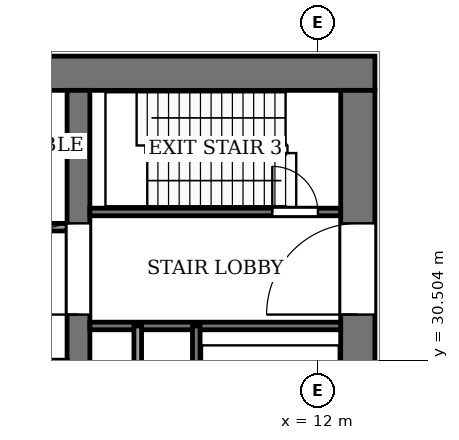
"""IFC4 building model, lengths in metres.
Left out: names, types, materials, properties, quantities, classifications, styles, units other than length and angle.
Written with IfcOpenShell. Run it as: python <this file> out.ifc"""

import sys

from ifc_helpers import new_model, si_unit, direction, frame, frame_2d, origin, place, context, subcontext, project, spatial, rectangle, extrude, element, fill, save


model = new_model("IFC4")
c1 = context("Model", 3, precision=1e-05, world=origin(), true_north=direction((0.0, 1.0)))
c2 = subcontext(c1, "Body", "Model", "MODEL_VIEW")
j1 = project(units=[si_unit("LENGTHUNIT", "METRE"), si_unit("PLANEANGLEUNIT", "RADIAN")], contexts=[c1])
p1 = place(None, origin())
s1 = spatial("IfcSite", under=j1, at=p1, CompositionType="ELEMENT")
p2 = place(p1, origin())
s2 = spatial("IfcBuilding", under=s1, at=p2, CompositionType="ELEMENT")
p3 = place(p2, frame((0.0, 0.0, 177.0)))
s3 = spatial("IfcBuildingStorey", under=s2, at=p3, CompositionType="ELEMENT", Elevation=177.0)
p4 = place(p3, frame((-13.5, 38.05, -0.13), z_axis=(0.0, 0.0, 1.0), x_axis=(1.0, 0.0, 0.0)))
e1 = element("IfcWall", 1, at=p4, inside=s3, PredefinedType="SHEAR", context=c2, shape_type="SweptSolid", body=[
    extrude(rectangle(XDim=27.0, YDim=0.9, at=frame_2d((13.5, 0.0))), origin(), (0.0, 0.0, 1.0), 5.0),
])
p5 = place(p3, frame((13.05, 18.4, -0.13), z_axis=(0.0, 0.0, 1.0), x_axis=(0.0, 1.0, 0.0)))
e2 = element("IfcWall", 2, at=p5, inside=s3, PredefinedType="SHEAR", context=c2, shape_type="SweptSolid", body=[
    extrude(rectangle(XDim=19.2, YDim=0.9, at=frame_2d((9.6, 0.0))), origin(), (0.0, 0.0, 1.0), 5.0),
])
p6 = place(p5, frame((2.8, 0.0, 0.13)))
e3 = element("IfcOpeningElement", 3, at=p6, cuts=e2, PredefinedType="OPENING", context=c2, shape_type="SweptSolid", body=[
    extrude(rectangle(XDim=2.4, YDim=2.4, at=frame_2d((1.2, 1.2))), frame((0.0, 0.46, 0.0), z_axis=(0.0, -1.0, 0.0), x_axis=(1.0, 0.0, 0.0)), (0.0, 0.0, 1.0), 0.92),
])
p7 = place(p5, frame((13.3, 0.0, 0.13)))
e4 = element("IfcOpeningElement", 4, at=p7, cuts=e2, PredefinedType="OPENING", context=c2, shape_type="SweptSolid", body=[
    extrude(rectangle(XDim=2.4, YDim=2.4, at=frame_2d((1.2, 1.2))), frame((0.0, 0.46, 0.0), z_axis=(0.0, -1.0, 0.0), x_axis=(1.0, 0.0, 0.0)), (0.0, 0.0, 1.0), 0.92),
])
p8 = place(p3, frame((5.7, 18.4, -0.13), z_axis=(0.0, 0.0, 1.0), x_axis=(0.0, 1.0, 0.0)))
e5 = element("IfcWall", 5, at=p8, inside=s3, PredefinedType="SHEAR", context=c2, shape_type="SweptSolid", body=[
    extrude(rectangle(XDim=19.2, YDim=0.6, at=frame_2d((9.6, 0.0))), origin(), (0.0, 0.0, 1.0), 5.0),
])
p9 = place(p8, frame((13.3, 0.0, 0.13)))
e6 = element("IfcOpeningElement", 6, at=p9, cuts=e5, PredefinedType="OPENING", context=c2, shape_type="SweptSolid", body=[
    extrude(rectangle(XDim=2.4, YDim=2.4, at=frame_2d((1.2, 1.2))), frame((0.0, 0.31, 0.0), z_axis=(0.0, -1.0, 0.0), x_axis=(1.0, 0.0, 0.0)), (0.0, 0.0, 1.0), 0.62),
])
p10 = place(p3, frame((6.0, 31.4, 0.0), z_axis=(0.0, 0.0, 1.0), x_axis=(1.0, 0.0, 0.0)))
e7 = element("IfcWall", 7, at=p10, inside=s3, PredefinedType="PARTITIONING", context=c2, shape_type="SweptSolid", body=[
    extrude(rectangle(XDim=6.6, YDim=0.2, at=frame_2d((3.3, 0.0))), origin(), (0.0, 0.0, 1.0), 4.87),
])
p11 = place(p3, frame((-5.4, 34.0, 0.0), z_axis=(0.0, 0.0, 1.0), x_axis=(1.0, 0.0, 0.0)))
e8 = element("IfcWall", 8, at=p11, inside=s3, PredefinedType="PARTITIONING", context=c2, shape_type="SweptSolid", body=[
    extrude(rectangle(XDim=10.8, YDim=0.2, at=frame_2d((5.4, 0.0))), origin(), (0.0, 0.0, 1.0), 4.87),
])
p12 = place(p11, frame((6.15, 0.0, 0.0)))
e9 = element("IfcOpeningElement", 9, at=p12, cuts=e8, PredefinedType="OPENING", context=c2, shape_type="SweptSolid", body=[
    extrude(rectangle(XDim=1.2, YDim=2.2, at=frame_2d((0.6, 1.1))), frame((0.0, 0.11, 0.0), z_axis=(0.0, -1.0, 0.0), x_axis=(1.0, 0.0, 0.0)), (0.0, 0.0, 1.0), 0.22),
])
p13 = place(p11, frame((8.95, 0.0, 0.0)))
e10 = element("IfcOpeningElement", 10, at=p13, cuts=e8, PredefinedType="OPENING", context=c2, shape_type="SweptSolid", body=[
    extrude(rectangle(XDim=1.0, YDim=2.1, at=frame_2d((0.5, 1.05))), frame((0.0, 0.11, 0.0), z_axis=(0.0, -1.0, 0.0), x_axis=(1.0, 0.0, 0.0)), (0.0, 0.0, 1.0), 0.22),
])
p14 = place(p3, frame((6.0, 34.4, 0.0), z_axis=(0.0, 0.0, 1.0), x_axis=(1.0, 0.0, 0.0)))
e11 = element("IfcWall", 11, at=p14, inside=s3, PredefinedType="PARTITIONING", context=c2, shape_type="SweptSolid", body=[
    extrude(rectangle(XDim=6.6, YDim=0.2, at=frame_2d((3.3, 0.0))), origin(), (0.0, 0.0, 1.0), 4.87),
])
p15 = place(p14, frame((4.8, 0.0, 0.0)))
e12 = element("IfcOpeningElement", 12, at=p15, cuts=e11, PredefinedType="OPENING", context=c2, shape_type="SweptSolid", body=[
    extrude(rectangle(XDim=1.2, YDim=2.2, at=frame_2d((0.6, 1.1))), frame((0.0, 0.11, 0.0), z_axis=(0.0, -1.0, 0.0), x_axis=(1.0, 0.0, 0.0)), (0.0, 0.0, 1.0), 0.22),
])
for number, where, z_axis, x_axis in (
    (13, (7.26, 24.0, 0.0), (0.0, 0.0, 1.0), (0.0, 1.0, 0.0)),
    (14, (8.8, 24.0, 0.0), (0.0, 0.0, 1.0), (0.0, 1.0, 0.0)),
):
    element("IfcWall", number, at=place(p3, frame(where, z_axis=z_axis, x_axis=x_axis)), inside=s3, PredefinedType="PARTITIONING", context=c2, shape_type="SweptSolid", body=[
        extrude(rectangle(XDim=7.4, YDim=0.2, at=frame_2d((3.7, 0.0))), origin(), (0.0, 0.0, 1.0), 4.87),
    ])
p16 = place(p15, origin())
e15 = element("IfcDoor", 15, at=p16, inside=s3, OperationType="SINGLE_SWING_RIGHT", PredefinedType="DOOR", context=c2, shape_type="SweptSolid", body=[
    extrude(rectangle(XDim=1.2, YDim=2.2, at=frame_2d((0.6, 1.1))), frame((0.0, 0.025, 0.0), z_axis=(0.0, -1.0, 0.0), x_axis=(1.0, 0.0, 0.0)), (0.0, 0.0, 1.0), 0.05),
])
fill(e12, e15)
p17 = place(p9, origin())
e16 = element("IfcDoor", 16, at=p17, inside=s3, OperationType="DOUBLE_DOOR_SINGLE_SWING", PredefinedType="DOOR", context=c2, shape_type="SweptSolid", body=[
    extrude(rectangle(XDim=2.4, YDim=2.4, at=frame_2d((1.2, 1.2))), frame((0.0, 0.025, 0.0), z_axis=(0.0, -1.0, 0.0), x_axis=(1.0, 0.0, 0.0)), (0.0, 0.0, 1.0), 0.05),
])
fill(e6, e16)
p18 = place(p7, origin())
e17 = element("IfcDoor", 17, at=p18, inside=s3, OperationType="DOUBLE_DOOR_SINGLE_SWING", PredefinedType="DOOR", context=c2, shape_type="SweptSolid", body=[
    extrude(rectangle(XDim=2.4, YDim=2.4, at=frame_2d((1.2, 1.2))), frame((0.0, 0.025, 0.0), z_axis=(0.0, -1.0, 0.0), x_axis=(1.0, 0.0, 0.0)), (0.0, 0.0, 1.0), 0.05),
])
fill(e4, e17)
save(model, sys.argv[1])
